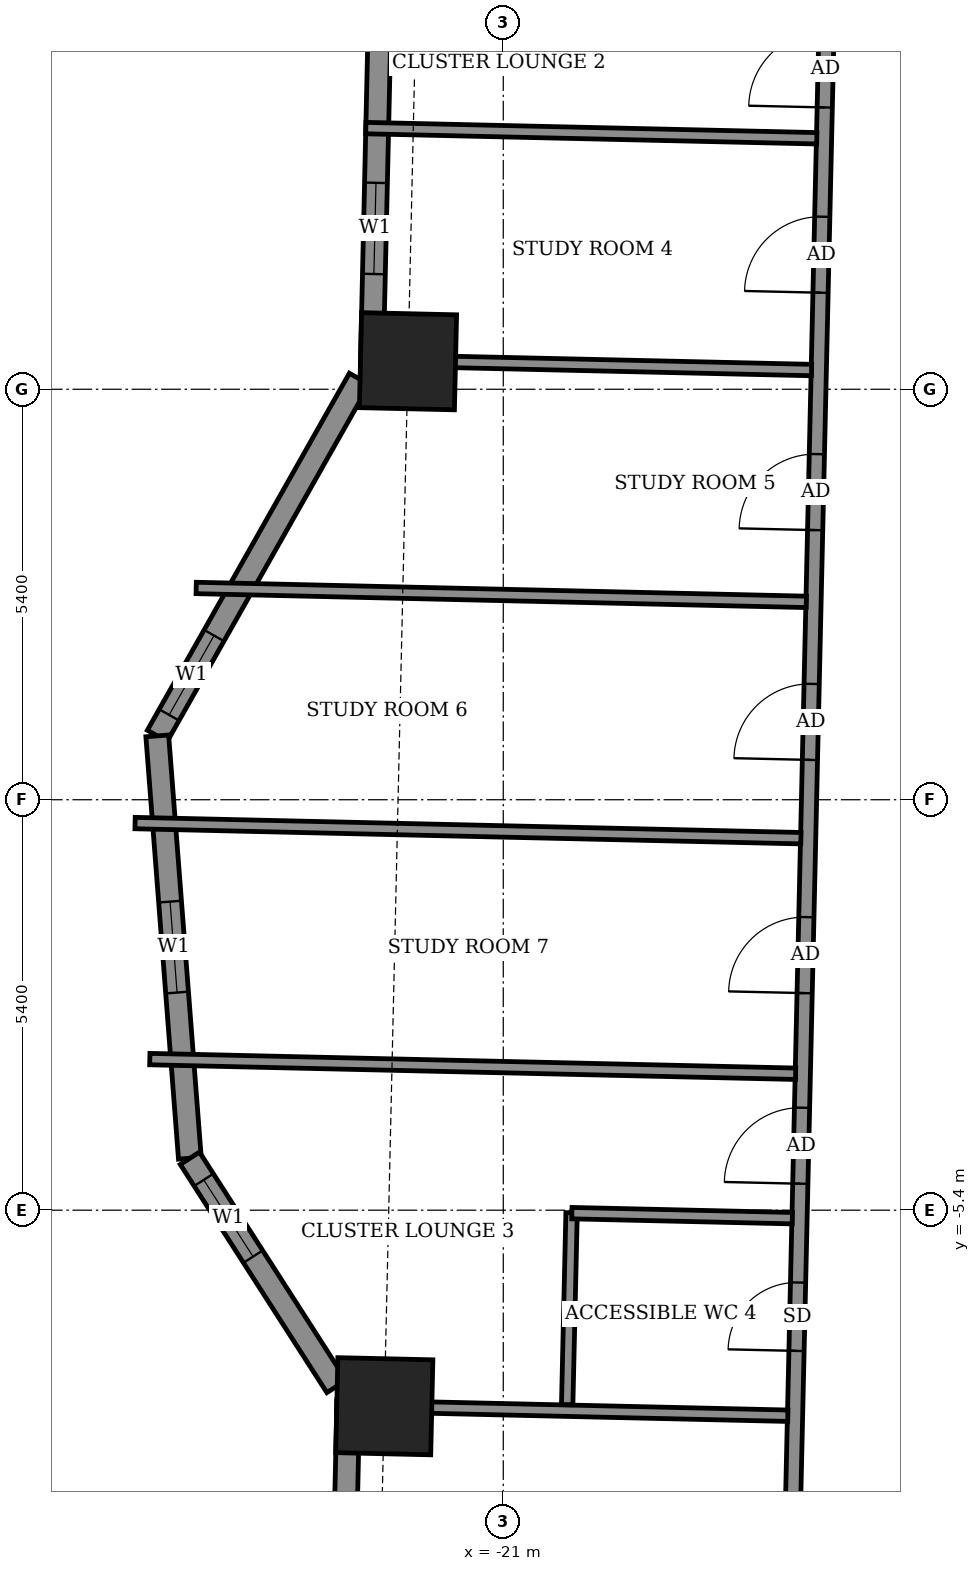
"""IFC4 building model, lengths in metres.
Left out: names, types, materials, properties, quantities, classifications, styles, units other than length and angle.
Written with IfcOpenShell. Run it as: python <this file> out.ifc"""

import sys

from ifc_helpers import new_model, si_unit, direction, frame, frame_2d, origin, origin_2d, place, context, subcontext, project, spatial, rectangle, extrude, element, fill, save


model = new_model("IFC4")
c1 = context("Model", 3, precision=1e-05, world=origin(), true_north=direction((0.0, 1.0)))
c2 = subcontext(c1, "Body", "Model", "MODEL_VIEW")
j1 = project(units=[si_unit("LENGTHUNIT", "METRE"), si_unit("PLANEANGLEUNIT", "RADIAN")], contexts=[c1])
p1 = place(None, origin())
s1 = spatial("IfcSite", under=j1, at=p1, CompositionType="ELEMENT")
p2 = place(p1, origin())
s2 = spatial("IfcBuilding", under=s1, at=p2, CompositionType="ELEMENT")
p3 = place(p2, frame((0.0, 0.0, 156.3)))
s3 = spatial("IfcBuildingStorey", under=s2, at=p3, CompositionType="ELEMENT", Elevation=156.3)
for number, where, z_axis, x_axis in (
    (1, (-22.565, -7.979, -0.55), (0.0, 0.0, 1.0), (-0.023, -1.0, 0.0)),
    (2, (-22.253, 5.769, -0.55), (0.0, 0.0, 1.0), (-0.023, -1.0, 0.0)),
):
    element("IfcColumn", number, at=place(p3, frame(where, z_axis=z_axis, x_axis=x_axis)), inside=s3, PredefinedType="COLUMN", context=c2, shape_type="SweptSolid", body=[
        extrude(rectangle(XDim=1.25, YDim=1.25, at=origin_2d()), origin(), (0.0, 0.0, 1.0), 3.6),
    ])
p4 = place(p3, frame((-22.501, 15.751, 0.0), z_axis=(0.0, 0.0, 1.0), x_axis=(-0.022737995473, -0.999741458359, 0.0)))
e3 = element("IfcWall", 3, at=p4, inside=s3, PredefinedType="SOLIDWALL", context=c2, shape_type="SweptSolid", body=[
    extrude(rectangle(XDim=10.029, YDim=0.3, at=frame_2d((5.014, 0.0))), origin(), (0.0, 0.0, 1.0), 3.05),
])
p5 = place(p4, frame((1.287, 0.0, 0.0)))
e4 = element("IfcOpeningElement", 4, at=p5, cuts=e3, PredefinedType="OPENING", context=c2, shape_type="SweptSolid", body=[
    extrude(rectangle(XDim=1.2, YDim=2.4, at=frame_2d((0.6, 1.2))), frame((0.0, 0.16, 0.0), z_axis=(0.0, -1.0, 0.0), x_axis=(1.0, 0.0, 0.0)), (0.0, 0.0, 1.0), 0.32),
])
p6 = place(p4, frame((3.144, 0.0, 0.9)))
e5 = element("IfcOpeningElement", 5, at=p6, cuts=e3, PredefinedType="OPENING", context=c2, shape_type="SweptSolid", body=[
    extrude(rectangle(XDim=0.9, YDim=1.5, at=frame_2d((0.45, 0.75))), frame((0.0, 0.16, 0.0), z_axis=(0.0, -1.0, 0.0), x_axis=(1.0, 0.0, 0.0)), (0.0, 0.0, 1.0), 0.32),
])
p7 = place(p4, frame((7.637, 0.0, 0.9)))
e6 = element("IfcOpeningElement", 6, at=p7, cuts=e3, PredefinedType="OPENING", context=c2, shape_type="SweptSolid", body=[
    extrude(rectangle(XDim=1.2, YDim=1.5, at=frame_2d((0.6, 0.75))), frame((0.0, 0.16, 0.0), z_axis=(0.0, -1.0, 0.0), x_axis=(1.0, 0.0, 0.0)), (0.0, 0.0, 1.0), 0.32),
])
p8 = place(p3, frame((-22.894, 5.537, 0.0), z_axis=(0.0, 0.0, 1.0), x_axis=(-0.492495436053, -0.870315026566, 0.0)))
e7 = element("IfcWall", 7, at=p8, inside=s3, PredefinedType="SOLIDWALL", context=c2, shape_type="SweptSolid", body=[
    extrude(rectangle(XDim=5.397, YDim=0.3, at=frame_2d((2.698, 0.0))), origin(), (0.0, 0.0, 1.0), 3.05),
])
p9 = place(p8, frame((3.88, 0.0, 0.9)))
e8 = element("IfcOpeningElement", 8, at=p9, cuts=e7, PredefinedType="OPENING", context=c2, shape_type="SweptSolid", body=[
    extrude(rectangle(XDim=1.2, YDim=1.5, at=frame_2d((0.6, 0.75))), frame((0.0, 0.16, 0.0), z_axis=(0.0, -1.0, 0.0), x_axis=(1.0, 0.0, 0.0)), (0.0, 0.0, 1.0), 0.32),
])
p10 = place(p3, frame((-25.552, 0.84, 0.0), z_axis=(0.0, 0.0, 1.0), x_axis=(0.076961115238, -0.997034095075, 0.0)))
e9 = element("IfcWall", 9, at=p10, inside=s3, PredefinedType="SOLIDWALL", context=c2, shape_type="SweptSolid", body=[
    extrude(rectangle(XDim=5.574, YDim=0.3, at=frame_2d((2.787, 0.0))), origin(), (0.0, 0.0, 1.0), 3.05),
])
p11 = place(p10, frame((2.187, 0.0, 0.9)))
e10 = element("IfcOpeningElement", 10, at=p11, cuts=e9, PredefinedType="OPENING", context=c2, shape_type="SweptSolid", body=[
    extrude(rectangle(XDim=1.2, YDim=1.5, at=frame_2d((0.6, 0.75))), frame((0.0, 0.16, 0.0), z_axis=(0.0, -1.0, 0.0), x_axis=(1.0, 0.0, 0.0)), (0.0, 0.0, 1.0), 0.32),
])
p12 = place(p3, frame((-25.123, -4.717, 0.0), z_axis=(0.0, 0.0, 1.0), x_axis=(0.54058467792, -0.841289608873, 0.0)))
e11 = element("IfcWall", 11, at=p12, inside=s3, PredefinedType="SOLIDWALL", context=c2, shape_type="SweptSolid", body=[
    extrude(rectangle(XDim=3.568, YDim=0.3, at=frame_2d((1.784, 0.0))), origin(), (0.0, 0.0, 1.0), 3.05),
])
p13 = place(p12, frame((0.338, 0.0, 0.9)))
e12 = element("IfcOpeningElement", 12, at=p13, cuts=e11, PredefinedType="OPENING", context=c2, shape_type="SweptSolid", body=[
    extrude(rectangle(XDim=1.2, YDim=1.5, at=frame_2d((0.6, 0.75))), frame((0.0, 0.16, 0.0), z_axis=(0.0, -1.0, 0.0), x_axis=(1.0, 0.0, 0.0)), (0.0, 0.0, 1.0), 0.32),
])
p14 = place(p3, frame((-23.038, -7.913, 0.0), z_axis=(0.0, 0.0, 1.0), x_axis=(-0.022705985163, -0.999742185885, 0.0)))
e13 = element("IfcWall", 13, at=p14, inside=s3, PredefinedType="SOLIDWALL", context=c2, shape_type="SweptSolid", body=[
    extrude(rectangle(XDim=10.43, YDim=0.3, at=frame_2d((5.215, 0.0))), origin(), (0.0, 0.0, 1.0), 3.05),
])
p15 = place(p14, frame((1.936, 0.0, 0.0)))
e14 = element("IfcOpeningElement", 14, at=p15, cuts=e13, PredefinedType="OPENING", context=c2, shape_type="SweptSolid", body=[
    extrude(rectangle(XDim=1.5, YDim=2.4, at=frame_2d((0.75, 1.2))), frame((0.0, 0.16, 0.0), z_axis=(0.0, -1.0, 0.0), x_axis=(1.0, 0.0, 0.0)), (0.0, 0.0, 1.0), 0.32),
])
p16 = place(p14, frame((7.67, 0.0, 0.9)))
e15 = element("IfcOpeningElement", 15, at=p16, cuts=e13, PredefinedType="OPENING", context=c2, shape_type="SweptSolid", body=[
    extrude(rectangle(XDim=1.2, YDim=1.5, at=frame_2d((0.6, 0.75))), frame((0.0, 0.16, 0.0), z_axis=(0.0, -1.0, 0.0), x_axis=(1.0, 0.0, 0.0)), (0.0, 0.0, 1.0), 0.32),
])
p17 = place(p3, frame((-25.421, 8.966, 0.0), z_axis=(0.0, 0.0, 1.0), x_axis=(0.022665943652, 0.999743094499, 0.0)))
e16 = element("IfcWall", 16, at=p17, inside=s3, PredefinedType="USERDEFINED", context=c2, shape_type="SweptSolid", body=[
    extrude(rectangle(XDim=6.0, YDim=0.55, at=frame_2d((3.0, 0.0))), origin(), (0.0, 0.0, 1.0), 0.8),
])
p18 = place(p3, frame((-25.875, -11.029, 0.0), z_axis=(0.0, 0.0, 1.0), x_axis=(0.022590224177, 0.999744808324, 0.0)))
e17 = element("IfcWall", 17, at=p18, inside=s3, PredefinedType="USERDEFINED", context=c2, shape_type="SweptSolid", body=[
    extrude(rectangle(XDim=2.875, YDim=0.55, at=frame_2d((1.438, 0.0))), origin(), (0.0, 0.0, 1.0), 0.8),
])
p19 = place(p3, frame((-17.32, -15.098, 0.0), z_axis=(0.0, 0.0, 1.0), x_axis=(0.022694293906, 0.999742451346, 0.0)))
e18 = element("IfcWall", 18, at=p19, inside=s3, PredefinedType="PARTITIONING", context=c2, shape_type="SweptSolid", body=[
    extrude(rectangle(XDim=28.024, YDim=0.2, at=frame_2d((14.012, 0.0))), origin(), (0.0, 0.0, 1.0), 3.05),
])
p20 = place(p19, frame((24.212, 0.0, 0.0)))
e19 = element("IfcOpeningElement", 19, at=p20, cuts=e18, PredefinedType="OPENING", context=c2, shape_type="SweptSolid", body=[
    extrude(rectangle(XDim=1.0, YDim=2.1, at=frame_2d((0.5, 1.05))), frame((0.0, 0.11, 0.0), z_axis=(0.0, -1.0, 0.0), x_axis=(1.0, 0.0, 0.0)), (0.0, 0.0, 1.0), 0.22),
])
p21 = place(p19, frame((26.374, 0.0, 0.0)))
e20 = element("IfcOpeningElement", 20, at=p21, cuts=e18, PredefinedType="OPENING", context=c2, shape_type="SweptSolid", body=[
    extrude(rectangle(XDim=0.9, YDim=2.1, at=frame_2d((0.45, 1.05))), frame((0.0, 0.11, 0.0), z_axis=(0.0, -1.0, 0.0), x_axis=(1.0, 0.0, 0.0)), (0.0, 0.0, 1.0), 0.22),
])
p22 = place(p19, frame((21.774, 0.0, 0.0)))
e21 = element("IfcOpeningElement", 21, at=p22, cuts=e18, PredefinedType="OPENING", context=c2, shape_type="SweptSolid", body=[
    extrude(rectangle(XDim=1.0, YDim=2.1, at=frame_2d((0.5, 1.05))), frame((0.0, 0.11, 0.0), z_axis=(0.0, -1.0, 0.0), x_axis=(1.0, 0.0, 0.0)), (0.0, 0.0, 1.0), 0.22),
])
p23 = place(p19, frame((18.65, 0.0, 0.0)))
e22 = element("IfcOpeningElement", 22, at=p23, cuts=e18, PredefinedType="OPENING", context=c2, shape_type="SweptSolid", body=[
    extrude(rectangle(XDim=1.0, YDim=2.1, at=frame_2d((0.5, 1.05))), frame((0.0, 0.11, 0.0), z_axis=(0.0, -1.0, 0.0), x_axis=(1.0, 0.0, 0.0)), (0.0, 0.0, 1.0), 0.22),
])
p24 = place(p19, frame((15.626, 0.0, 0.0)))
e23 = element("IfcOpeningElement", 23, at=p24, cuts=e18, PredefinedType="OPENING", context=c2, shape_type="SweptSolid", body=[
    extrude(rectangle(XDim=1.0, YDim=2.1, at=frame_2d((0.5, 1.05))), frame((0.0, 0.11, 0.0), z_axis=(0.0, -1.0, 0.0), x_axis=(1.0, 0.0, 0.0)), (0.0, 0.0, 1.0), 0.22),
])
p25 = place(p19, frame((12.557, 0.0, 0.0)))
e24 = element("IfcOpeningElement", 24, at=p25, cuts=e18, PredefinedType="OPENING", context=c2, shape_type="SweptSolid", body=[
    extrude(rectangle(XDim=1.0, YDim=2.1, at=frame_2d((0.5, 1.05))), frame((0.0, 0.11, 0.0), z_axis=(0.0, -1.0, 0.0), x_axis=(1.0, 0.0, 0.0)), (0.0, 0.0, 1.0), 0.22),
])
p26 = place(p19, frame((10.049, 0.0, 0.0)))
e25 = element("IfcOpeningElement", 25, at=p26, cuts=e18, PredefinedType="OPENING", context=c2, shape_type="SweptSolid", body=[
    extrude(rectangle(XDim=1.0, YDim=2.1, at=frame_2d((0.5, 1.05))), frame((0.0, 0.11, 0.0), z_axis=(0.0, -1.0, 0.0), x_axis=(1.0, 0.0, 0.0)), (0.0, 0.0, 1.0), 0.22),
])
p27 = place(p19, frame((7.849, 0.0, 0.0)))
e26 = element("IfcOpeningElement", 26, at=p27, cuts=e18, PredefinedType="OPENING", context=c2, shape_type="SweptSolid", body=[
    extrude(rectangle(XDim=0.9, YDim=2.1, at=frame_2d((0.45, 1.05))), frame((0.0, 0.11, 0.0), z_axis=(0.0, -1.0, 0.0), x_axis=(1.0, 0.0, 0.0)), (0.0, 0.0, 1.0), 0.22),
])
p28 = place(p19, frame((4.199, 0.0, 0.0)))
e27 = element("IfcOpeningElement", 27, at=p28, cuts=e18, PredefinedType="OPENING", context=c2, shape_type="SweptSolid", body=[
    extrude(rectangle(XDim=1.0, YDim=2.1, at=frame_2d((0.5, 1.05))), frame((0.0, 0.11, 0.0), z_axis=(0.0, -1.0, 0.0), x_axis=(1.0, 0.0, 0.0)), (0.0, 0.0, 1.0), 0.22),
])
p29 = place(p19, frame((0.75, 0.0, 0.0)))
e28 = element("IfcOpeningElement", 28, at=p29, cuts=e18, PredefinedType="OPENING", context=c2, shape_type="SweptSolid", body=[
    extrude(rectangle(XDim=0.9, YDim=2.1, at=frame_2d((0.45, 1.05))), frame((0.0, 0.11, 0.0), z_axis=(0.0, -1.0, 0.0), x_axis=(1.0, 0.0, 0.0)), (0.0, 0.0, 1.0), 0.22),
])
p30 = place(p3, frame((-23.19, -7.969, 0.0), z_axis=(0.0, 0.0, 1.0), x_axis=(0.999741261868, -0.022746633113, 0.0)))
e29 = element("IfcWall", 29, at=p30, inside=s3, PredefinedType="PARTITIONING", context=c2, shape_type="SweptSolid", body=[
    extrude(rectangle(XDim=5.935, YDim=0.15, at=frame_2d((2.968, 0.0))), origin(), (0.0, 0.0, 1.0), 3.05),
])
p31 = place(p3, frame((-20.159, -7.958, 0.0), z_axis=(0.0, 0.0, 1.0), x_axis=(0.022919108675, 0.999737322729, 0.0)))
e30 = element("IfcWall", 30, at=p31, inside=s3, PredefinedType="PARTITIONING", context=c2, shape_type="SweptSolid", body=[
    extrude(rectangle(XDim=2.525, YDim=0.15, at=frame_2d((1.262, 0.0))), origin(), (0.0, 0.0, 1.0), 3.05),
])
p32 = place(p3, frame((-20.097, -5.439, 0.0), z_axis=(0.0, 0.0, 1.0), x_axis=(0.999741748633, -0.022725229174, 0.0)))
e31 = element("IfcWall", 31, at=p32, inside=s3, PredefinedType="PARTITIONING", context=c2, shape_type="SweptSolid", body=[
    extrude(rectangle(XDim=2.901, YDim=0.15, at=frame_2d((1.45, 0.0))), origin(), (0.0, 0.0, 1.0), 3.05),
])
p33 = place(p3, frame((-25.65, -3.412, 0.0), z_axis=(0.0, 0.0, 1.0), x_axis=(0.999742413658, -0.022695954102, 0.0)))
e32 = element("IfcWall", 32, at=p33, inside=s3, PredefinedType="PARTITIONING", context=c2, shape_type="SweptSolid", body=[
    extrude(rectangle(XDim=8.498, YDim=0.15, at=frame_2d((4.249, 0.0))), origin(), (0.0, 0.0, 1.0), 2.1),
])
p34 = place(p3, frame((-25.844, -0.307, 0.0), z_axis=(0.0, 0.0, 1.0), x_axis=(0.999741504596, -0.022735962424, 0.0)))
e33 = element("IfcWall", 33, at=p34, inside=s3, PredefinedType="PARTITIONING", context=c2, shape_type="SweptSolid", body=[
    extrude(rectangle(XDim=8.762, YDim=0.15, at=frame_2d((4.381, 0.0))), origin(), (0.0, 0.0, 1.0), 2.1),
])
p35 = place(p3, frame((-25.04, 2.786, 0.0), z_axis=(0.0, 0.0, 1.0), x_axis=(0.999740625399, -0.022774589508, 0.0)))
e34 = element("IfcWall", 34, at=p35, inside=s3, PredefinedType="PARTITIONING", context=c2, shape_type="SweptSolid", body=[
    extrude(rectangle(XDim=8.029, YDim=0.15, at=frame_2d((4.015, 0.0))), origin(), (0.0, 0.0, 1.0), 2.1),
])
p36 = place(p3, frame((-22.578, 5.78, 0.0), z_axis=(0.0, 0.0, 1.0), x_axis=(0.999746200787, -0.022528515532, 0.0)))
e35 = element("IfcWall", 35, at=p36, inside=s3, PredefinedType="PARTITIONING", context=c2, shape_type="SweptSolid", body=[
    extrude(rectangle(XDim=5.635, YDim=0.15, at=frame_2d((2.818, 0.0))), origin(), (0.0, 0.0, 1.0), 3.05),
])
p37 = place(p3, frame((-22.808, 8.836, 0.0), z_axis=(0.0, 0.0, 1.0), x_axis=(0.999744927012, -0.022584970987, 0.0)))
e36 = element("IfcWall", 36, at=p37, inside=s3, PredefinedType="PARTITIONING", context=c2, shape_type="SweptSolid", body=[
    extrude(rectangle(XDim=5.935, YDim=0.15, at=frame_2d((2.967, 0.0))), origin(), (0.0, 0.0, 1.0), 2.55),
])
p38 = place(p7, origin())
e37 = element("IfcWindow", 37, at=p38, inside=s3, PartitioningType="SINGLE_PANEL", PredefinedType="WINDOW", context=c2, shape_type="SweptSolid", body=[
    extrude(rectangle(XDim=1.2, YDim=1.5, at=frame_2d((0.6, 0.75))), frame((0.0, 0.03, 0.0), z_axis=(0.0, -1.0, 0.0), x_axis=(1.0, 0.0, 0.0)), (0.0, 0.0, 1.0), 0.06),
])
fill(e6, e37)
p39 = place(p9, origin())
e38 = element("IfcWindow", 38, at=p39, inside=s3, PartitioningType="SINGLE_PANEL", PredefinedType="WINDOW", context=c2, shape_type="SweptSolid", body=[
    extrude(rectangle(XDim=1.2, YDim=1.5, at=frame_2d((0.6, 0.75))), frame((0.0, 0.03, 0.0), z_axis=(0.0, -1.0, 0.0), x_axis=(1.0, 0.0, 0.0)), (0.0, 0.0, 1.0), 0.06),
])
fill(e8, e38)
p40 = place(p11, origin())
e39 = element("IfcWindow", 39, at=p40, inside=s3, PartitioningType="SINGLE_PANEL", PredefinedType="WINDOW", context=c2, shape_type="SweptSolid", body=[
    extrude(rectangle(XDim=1.2, YDim=1.5, at=frame_2d((0.6, 0.75))), frame((0.0, 0.03, 0.0), z_axis=(0.0, -1.0, 0.0), x_axis=(1.0, 0.0, 0.0)), (0.0, 0.0, 1.0), 0.06),
])
fill(e10, e39)
p41 = place(p13, origin())
e40 = element("IfcWindow", 40, at=p41, inside=s3, PartitioningType="SINGLE_PANEL", PredefinedType="WINDOW", context=c2, shape_type="SweptSolid", body=[
    extrude(rectangle(XDim=1.2, YDim=1.5, at=frame_2d((0.6, 0.75))), frame((0.0, 0.03, 0.0), z_axis=(0.0, -1.0, 0.0), x_axis=(1.0, 0.0, 0.0)), (0.0, 0.0, 1.0), 0.06),
])
fill(e12, e40)
p42 = place(p20, origin())
e41 = element("IfcDoor", 41, at=p42, inside=s3, OperationType="SINGLE_SWING_LEFT", PredefinedType="DOOR", context=c2, shape_type="SweptSolid", body=[
    extrude(rectangle(XDim=1.0, YDim=2.1, at=frame_2d((0.5, 1.05))), frame((0.0, 0.025, 0.0), z_axis=(0.0, -1.0, 0.0), x_axis=(1.0, 0.0, 0.0)), (0.0, 0.0, 1.0), 0.05),
])
fill(e19, e41)
p43 = place(p22, origin())
e42 = element("IfcDoor", 42, at=p43, inside=s3, OperationType="SINGLE_SWING_RIGHT", PredefinedType="DOOR", context=c2, shape_type="SweptSolid", body=[
    extrude(rectangle(XDim=1.0, YDim=2.1, at=frame_2d((0.5, 1.05))), frame((0.0, 0.025, 0.0), z_axis=(0.0, -1.0, 0.0), x_axis=(1.0, 0.0, 0.0)), (0.0, 0.0, 1.0), 0.05),
])
fill(e21, e42)
p44 = place(p23, origin())
e43 = element("IfcDoor", 43, at=p44, inside=s3, OperationType="SINGLE_SWING_LEFT", PredefinedType="DOOR", context=c2, shape_type="SweptSolid", body=[
    extrude(rectangle(XDim=1.0, YDim=2.1, at=frame_2d((0.5, 1.05))), frame((0.0, 0.025, 0.0), z_axis=(0.0, -1.0, 0.0), x_axis=(1.0, 0.0, 0.0)), (0.0, 0.0, 1.0), 0.05),
])
fill(e22, e43)
p45 = place(p24, origin())
e44 = element("IfcDoor", 44, at=p45, inside=s3, OperationType="SINGLE_SWING_RIGHT", PredefinedType="DOOR", context=c2, shape_type="SweptSolid", body=[
    extrude(rectangle(XDim=1.0, YDim=2.1, at=frame_2d((0.5, 1.05))), frame((0.0, 0.025, 0.0), z_axis=(0.0, -1.0, 0.0), x_axis=(1.0, 0.0, 0.0)), (0.0, 0.0, 1.0), 0.05),
])
fill(e23, e44)
p46 = place(p25, origin())
e45 = element("IfcDoor", 45, at=p46, inside=s3, OperationType="SINGLE_SWING_LEFT", PredefinedType="DOOR", context=c2, shape_type="SweptSolid", body=[
    extrude(rectangle(XDim=1.0, YDim=2.1, at=frame_2d((0.5, 1.05))), frame((0.0, 0.025, 0.0), z_axis=(0.0, -1.0, 0.0), x_axis=(1.0, 0.0, 0.0)), (0.0, 0.0, 1.0), 0.05),
])
fill(e24, e45)
p47 = place(p26, origin())
e46 = element("IfcDoor", 46, at=p47, inside=s3, OperationType="SINGLE_SWING_RIGHT", PredefinedType="DOOR", context=c2, shape_type="SweptSolid", body=[
    extrude(rectangle(XDim=1.0, YDim=2.1, at=frame_2d((0.5, 1.05))), frame((0.0, 0.025, 0.0), z_axis=(0.0, -1.0, 0.0), x_axis=(1.0, 0.0, 0.0)), (0.0, 0.0, 1.0), 0.05),
])
fill(e25, e46)
p48 = place(p27, origin())
e47 = element("IfcDoor", 47, at=p48, inside=s3, OperationType="SINGLE_SWING_RIGHT", PredefinedType="DOOR", context=c2, shape_type="SweptSolid", body=[
    extrude(rectangle(XDim=0.9, YDim=2.1, at=frame_2d((0.45, 1.05))), frame((0.0, 0.025, 0.0), z_axis=(0.0, -1.0, 0.0), x_axis=(1.0, 0.0, 0.0)), (0.0, 0.0, 1.0), 0.05),
])
fill(e26, e47)
save(model, sys.argv[1])
